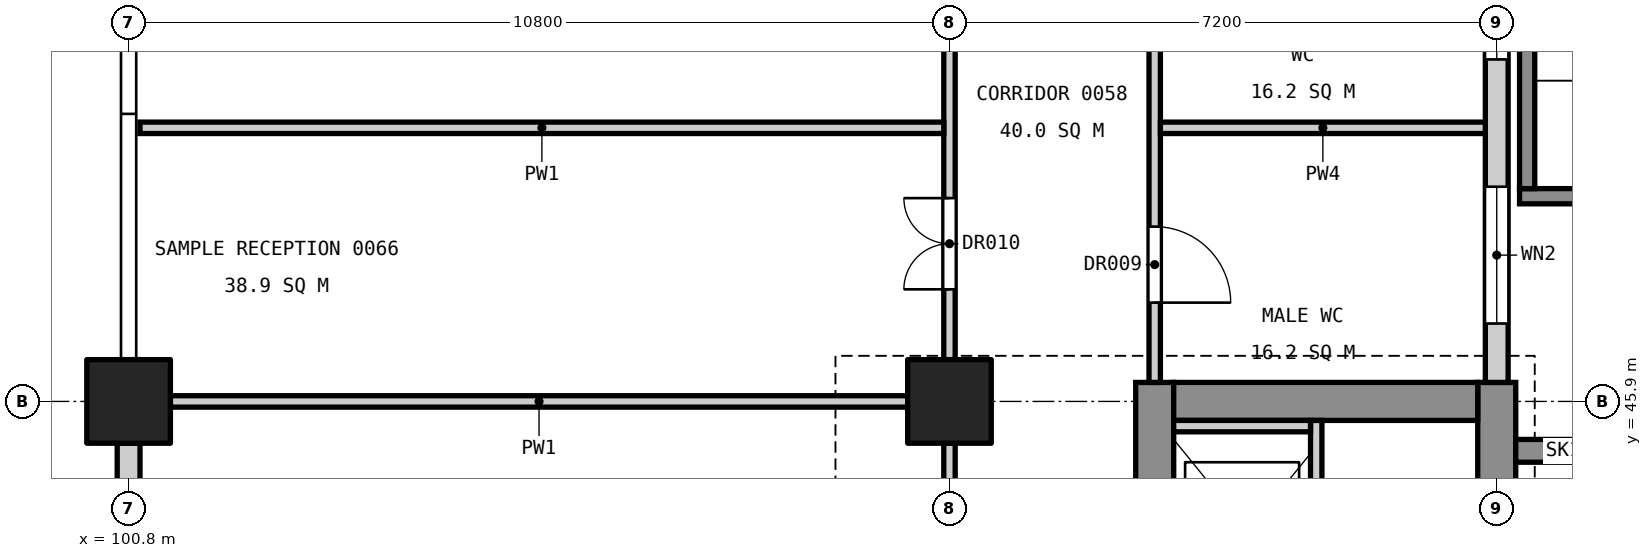
"""IFC4 building model, lengths in metres.
Left out: names, types, materials, properties, quantities, classifications, styles, units other than length and angle.
Written with IfcOpenShell. Run it as: python <this file> out.ifc"""

import sys

from ifc_helpers import new_model, si_unit, direction, frame, frame_2d, origin, origin_2d, place, context, subcontext, project, spatial, rectangle, extrude, element, fill, save


model = new_model("IFC4")
c1 = context("Model", 3, precision=1e-05, world=origin(), true_north=direction((0.0, 1.0)))
c2 = subcontext(c1, "Body", "Model", "MODEL_VIEW")
j1 = project(units=[si_unit("LENGTHUNIT", "METRE"), si_unit("PLANEANGLEUNIT", "RADIAN")], contexts=[c1])
p1 = place(None, origin())
s1 = spatial("IfcSite", under=j1, at=p1, CompositionType="ELEMENT")
p2 = place(p1, origin())
s2 = spatial("IfcBuilding", under=s1, at=p2, CompositionType="ELEMENT")
p3 = place(p2, origin())
s3 = spatial("IfcBuildingStorey", under=s2, at=p3, CompositionType="ELEMENT", Elevation=0.0)
for number, where, z_axis, x_axis in (
    (1, (111.6, 45.9, 0.0), (0.0, 0.0, 1.0), (1.0, 0.0, 0.0)),
    (2, (100.8, 45.9, 0.0), (0.0, 0.0, 1.0), (1.0, 0.0, 0.0)),
):
    element("IfcColumn", number, at=place(p3, frame(where, z_axis=z_axis, x_axis=x_axis)), inside=s3, PredefinedType="COLUMN", context=c2, shape_type="SweptSolid", body=[
        extrude(rectangle(XDim=1.1, YDim=1.1, at=origin_2d()), origin(), (0.0, 0.0, 1.0), 6.0),
    ])
p4 = place(p3, frame((118.8, 34.85, 0.0), z_axis=(0.0, 0.0, 1.0), x_axis=(0.0, 1.0, 0.0)))
e3 = element("IfcWall", 3, at=p4, inside=s3, PredefinedType="SHEAR", context=c2, shape_type="SweptSolid", body=[
    extrude(rectangle(XDim=11.3, YDim=0.5, at=frame_2d((5.65, 0.0))), origin(), (0.0, 0.0, 1.0), 5.7),
])
p5 = place(p4, frame((6.58, 0.0, 3.4)))
e4 = element("IfcOpeningElement", 4, at=p5, cuts=e3, PredefinedType="OPENING", context=c2, shape_type="SweptSolid", body=[
    extrude(rectangle(XDim=1.2, YDim=0.9, at=frame_2d((0.6, 0.45))), frame((0.0, 0.26, 0.0), z_axis=(0.0, -1.0, 0.0), x_axis=(1.0, 0.0, 0.0)), (0.0, 0.0, 1.0), 0.52),
])
p6 = place(p3, frame((114.3, 34.85, 0.0), z_axis=(0.0, 0.0, 1.0), x_axis=(0.0, 1.0, 0.0)))
e5 = element("IfcWall", 5, at=p6, inside=s3, PredefinedType="SHEAR", context=c2, shape_type="SweptSolid", body=[
    extrude(rectangle(XDim=11.3, YDim=0.5, at=frame_2d((5.65, 0.0))), origin(), (0.0, 0.0, 1.0), 5.7),
])
p7 = place(p6, frame((0.55, 0.0, 0.0)))
e6 = element("IfcOpeningElement", 6, at=p7, cuts=e5, PredefinedType="OPENING", context=c2, shape_type="SweptSolid", body=[
    extrude(rectangle(XDim=1.4, YDim=2.1, at=frame_2d((0.7, 1.05))), frame((0.0, 0.26, 0.0), z_axis=(0.0, -1.0, 0.0), x_axis=(1.0, 0.0, 0.0)), (0.0, 0.0, 1.0), 0.52),
])
p8 = place(p6, frame((8.8, 0.0, 0.0)))
e7 = element("IfcOpeningElement", 7, at=p8, cuts=e5, PredefinedType="OPENING", context=c2, shape_type="SweptSolid", body=[
    extrude(rectangle(XDim=1.1, YDim=2.1, at=frame_2d((0.55, 1.05))), frame((0.0, 0.26, 0.0), z_axis=(0.0, -1.0, 0.0), x_axis=(1.0, 0.0, 0.0)), (0.0, 0.0, 1.0), 0.52),
])
p9 = place(p3, frame((118.55, 45.9, 0.0), z_axis=(0.0, 0.0, 1.0), x_axis=(-1.0, 0.0, 0.0)))
e8 = element("IfcWall", 8, at=p9, inside=s3, PredefinedType="SHEAR", context=c2, shape_type="SweptSolid", body=[
    extrude(rectangle(XDim=4.0, YDim=0.5, at=frame_2d((2.0, 0.0))), origin(), (0.0, 0.0, 1.0), 5.7),
])
p10 = place(p3, frame((119.05, 45.25, 0.0), z_axis=(0.0, 0.0, 1.0), x_axis=(1.0, 0.0, 0.0)))
e9 = element("IfcWall", 9, at=p10, inside=s3, PredefinedType="SHEAR", context=c2, shape_type="SweptSolid", body=[
    extrude(rectangle(XDim=1.25, YDim=0.3, at=frame_2d((0.625, 0.0))), origin(), (0.0, 0.0, 1.0), 6.0),
])
p11 = place(p3, frame((116.425, 43.0, 0.0), z_axis=(0.0, 0.0, 1.0), x_axis=(0.0, 1.0, 0.0)))
e10 = element("IfcWall", 10, at=p11, inside=s3, PredefinedType="SOLIDWALL", context=c2, shape_type="SweptSolid", body=[
    extrude(rectangle(XDim=2.65, YDim=0.15, at=frame_2d((1.325, 0.0))), origin(), (0.0, 0.0, 1.0), 6.0),
])
p12 = place(p3, frame((116.35, 45.575, 0.0), z_axis=(0.0, 0.0, 1.0), x_axis=(-1.0, 0.0, 0.0)))
e11 = element("IfcWall", 11, at=p12, inside=s3, PredefinedType="SOLIDWALL", context=c2, shape_type="SweptSolid", body=[
    extrude(rectangle(XDim=1.8, YDim=0.15, at=frame_2d((0.9, 0.0))), origin(), (0.0, 0.0, 1.0), 6.0),
])
p13 = place(p3, frame((118.8, 46.15, 0.0), z_axis=(0.0, 0.0, 1.0), x_axis=(0.0, 1.0, 0.0)))
e12 = element("IfcWall", 12, at=p13, inside=s3, PredefinedType="STANDARD", context=c2, shape_type="SweptSolid", body=[
    extrude(rectangle(XDim=10.0, YDim=0.3, at=frame_2d((5.0, 0.0))), origin(), (0.0, 0.0, 1.0), 4.7),
])
p14 = place(p13, frame((0.775, 0.0, 0.9)))
e13 = element("IfcOpeningElement", 13, at=p14, cuts=e12, PredefinedType="OPENING", context=c2, shape_type="SweptSolid", body=[
    extrude(rectangle(XDim=1.8, YDim=3.0, at=frame_2d((0.9, 1.5))), frame((0.0, 0.16, 0.0), z_axis=(0.0, -1.0, 0.0), x_axis=(1.0, 0.0, 0.0)), (0.0, 0.0, 1.0), 0.32),
])
p15 = place(p13, frame((4.25, 0.0, 0.9)))
e14 = element("IfcOpeningElement", 14, at=p15, cuts=e12, PredefinedType="OPENING", context=c2, shape_type="SweptSolid", body=[
    extrude(rectangle(XDim=1.8, YDim=3.0, at=frame_2d((0.9, 1.5))), frame((0.0, 0.16, 0.0), z_axis=(0.0, -1.0, 0.0), x_axis=(1.0, 0.0, 0.0)), (0.0, 0.0, 1.0), 0.32),
])
p16 = place(p13, frame((7.575, 0.0, 0.9)))
e15 = element("IfcOpeningElement", 15, at=p16, cuts=e12, PredefinedType="OPENING", context=c2, shape_type="SweptSolid", body=[
    extrude(rectangle(XDim=1.8, YDim=3.0, at=frame_2d((0.9, 1.5))), frame((0.0, 0.16, 0.0), z_axis=(0.0, -1.0, 0.0), x_axis=(1.0, 0.0, 0.0)), (0.0, 0.0, 1.0), 0.32),
])
p17 = place(p3, frame((100.8, 35.65, 0.0), z_axis=(0.0, 0.0, 1.0), x_axis=(0.0, 1.0, 0.0)))
e16 = element("IfcWall", 16, at=p17, inside=s3, PredefinedType="STANDARD", context=c2, shape_type="SweptSolid", body=[
    extrude(rectangle(XDim=9.7, YDim=0.3, at=frame_2d((4.85, 0.0))), origin(), (0.0, 0.0, 1.0), 4.6),
])
p18 = place(p3, frame((114.3, 46.15, 0.0), z_axis=(0.0, 0.0, 1.0), x_axis=(0.0, 1.0, 0.0)))
e17 = element("IfcWall", 17, at=p18, inside=s3, PredefinedType="PARTITIONING", context=c2, shape_type="SweptSolid", body=[
    extrude(rectangle(XDim=10.4, YDim=0.15, at=frame_2d((5.2, 0.0))), origin(), (0.0, 0.0, 1.0), 4.6),
])
p19 = place(p18, frame((4.65, 0.0, 0.0)))
e18 = element("IfcOpeningElement", 18, at=p19, cuts=e17, PredefinedType="OPENING", context=c2, shape_type="SweptSolid", body=[
    extrude(rectangle(XDim=1.0, YDim=2.1, at=frame_2d((0.5, 1.05))), frame((0.0, 0.085, 0.0), z_axis=(0.0, -1.0, 0.0), x_axis=(1.0, 0.0, 0.0)), (0.0, 0.0, 1.0), 0.17),
])
p20 = place(p18, frame((1.05, 0.0, 0.0)))
e19 = element("IfcOpeningElement", 19, at=p20, cuts=e17, PredefinedType="OPENING", context=c2, shape_type="SweptSolid", body=[
    extrude(rectangle(XDim=1.0, YDim=2.1, at=frame_2d((0.5, 1.05))), frame((0.0, 0.085, 0.0), z_axis=(0.0, -1.0, 0.0), x_axis=(1.0, 0.0, 0.0)), (0.0, 0.0, 1.0), 0.17),
])
p21 = place(p18, frame((8.25, 0.0, 0.0)))
e20 = element("IfcOpeningElement", 20, at=p21, cuts=e17, PredefinedType="OPENING", context=c2, shape_type="SweptSolid", body=[
    extrude(rectangle(XDim=1.0, YDim=2.1, at=frame_2d((0.5, 1.05))), frame((0.0, 0.085, 0.0), z_axis=(0.0, -1.0, 0.0), x_axis=(1.0, 0.0, 0.0)), (0.0, 0.0, 1.0), 0.17),
])
p22 = place(p3, frame((118.65, 49.5, 0.0), z_axis=(0.0, 0.0, 1.0), x_axis=(-1.0, 0.0, 0.0)))
e21 = element("IfcWall", 21, at=p22, inside=s3, PredefinedType="PARTITIONING", context=c2, shape_type="SweptSolid", body=[
    extrude(rectangle(XDim=4.275, YDim=0.15, at=frame_2d((2.137, 0.0))), origin(), (0.0, 0.0, 1.0), 4.9),
])
p23 = place(p3, frame((111.6, 41.9, 0.0), z_axis=(0.0, 0.0, 1.0), x_axis=(0.0, 1.0, 0.0)))
e22 = element("IfcWall", 22, at=p23, inside=s3, PredefinedType="PARTITIONING", context=c2, shape_type="SweptSolid", body=[
    extrude(rectangle(XDim=3.45, YDim=0.15, at=frame_2d((1.725, 0.0))), origin(), (0.0, 0.0, 1.0), 4.6),
])
p24 = place(p23, frame((1.125, 0.0, 0.0)))
e23 = element("IfcOpeningElement", 23, at=p24, cuts=e22, PredefinedType="OPENING", context=c2, shape_type="SweptSolid", body=[
    extrude(rectangle(XDim=1.2, YDim=2.1, at=frame_2d((0.6, 1.05))), frame((0.0, 0.085, 0.0), z_axis=(0.0, -1.0, 0.0), x_axis=(1.0, 0.0, 0.0)), (0.0, 0.0, 1.0), 0.17),
])
p25 = place(p3, frame((111.6, 46.45, 0.0), z_axis=(0.0, 0.0, 1.0), x_axis=(0.0, 1.0, 0.0)))
e24 = element("IfcWall", 24, at=p25, inside=s3, PredefinedType="PARTITIONING", context=c2, shape_type="SweptSolid", body=[
    extrude(rectangle(XDim=9.7, YDim=0.15, at=frame_2d((4.85, 0.0))), origin(), (0.0, 0.0, 1.0), 4.6),
])
p26 = place(p25, frame((4.25, 0.0, 0.0)))
e25 = element("IfcOpeningElement", 25, at=p26, cuts=e24, PredefinedType="OPENING", context=c2, shape_type="SweptSolid", body=[
    extrude(rectangle(XDim=1.2, YDim=2.1, at=frame_2d((0.6, 1.05))), frame((0.0, 0.085, 0.0), z_axis=(0.0, -1.0, 0.0), x_axis=(1.0, 0.0, 0.0)), (0.0, 0.0, 1.0), 0.17),
])
p27 = place(p25, frame((0.925, 0.0, 0.0)))
e26 = element("IfcOpeningElement", 26, at=p27, cuts=e24, PredefinedType="OPENING", context=c2, shape_type="SweptSolid", body=[
    extrude(rectangle(XDim=1.2, YDim=2.1, at=frame_2d((0.6, 1.05))), frame((0.0, 0.085, 0.0), z_axis=(0.0, -1.0, 0.0), x_axis=(1.0, 0.0, 0.0)), (0.0, 0.0, 1.0), 0.17),
])
p28 = place(p25, frame((7.575, 0.0, 0.0)))
e27 = element("IfcOpeningElement", 27, at=p28, cuts=e24, PredefinedType="OPENING", context=c2, shape_type="SweptSolid", body=[
    extrude(rectangle(XDim=1.2, YDim=2.1, at=frame_2d((0.6, 1.05))), frame((0.0, 0.085, 0.0), z_axis=(0.0, -1.0, 0.0), x_axis=(1.0, 0.0, 0.0)), (0.0, 0.0, 1.0), 0.17),
])
p29 = place(p3, frame((111.05, 45.9, 0.0), z_axis=(0.0, 0.0, 1.0), x_axis=(-1.0, 0.0, 0.0)))
e28 = element("IfcWall", 28, at=p29, inside=s3, PredefinedType="PARTITIONING", context=c2, shape_type="SweptSolid", body=[
    extrude(rectangle(XDim=9.7, YDim=0.15, at=frame_2d((4.85, 0.0))), origin(), (0.0, 0.0, 1.0), 4.9),
])
p30 = place(p3, frame((111.525, 49.5, 0.0), z_axis=(0.0, 0.0, 1.0), x_axis=(-1.0, 0.0, 0.0)))
e29 = element("IfcWall", 29, at=p30, inside=s3, PredefinedType="PARTITIONING", context=c2, shape_type="SweptSolid", body=[
    extrude(rectangle(XDim=10.575, YDim=0.15, at=frame_2d((5.288, 0.0))), origin(), (0.0, 0.0, 1.0), 4.9),
])
p31 = place(p3, frame((119.1, 48.6, 0.0), z_axis=(0.0, 0.0, 1.0), x_axis=(1.0, 0.0, 0.0)))
e30 = element("IfcWall", 30, at=p31, inside=s3, PredefinedType="SOLIDWALL", context=c2, shape_type="SweptSolid", body=[
    extrude(rectangle(XDim=4.4, YDim=0.2, at=frame_2d((2.2, 0.0))), origin(), (0.0, 0.0, 1.0), 3.3),
])
p32 = place(p31, frame((1.5, 0.0, 0.0)))
e31 = element("IfcOpeningElement", 31, at=p32, cuts=e30, PredefinedType="OPENING", context=c2, shape_type="SweptSolid", body=[
    extrude(rectangle(XDim=1.4, YDim=2.1, at=frame_2d((0.7, 1.05))), frame((0.0, 0.11, 0.0), z_axis=(0.0, -1.0, 0.0), x_axis=(1.0, 0.0, 0.0)), (0.0, 0.0, 1.0), 0.22),
])
p33 = place(p3, frame((119.2, 48.7, 0.0), z_axis=(0.0, 0.0, 1.0), x_axis=(0.0, 1.0, 0.0)))
e32 = element("IfcWall", 32, at=p33, inside=s3, PredefinedType="SOLIDWALL", context=c2, shape_type="SweptSolid", body=[
    extrude(rectangle(XDim=6.8, YDim=0.2, at=frame_2d((3.4, 0.0))), origin(), (0.0, 0.0, 1.0), 3.3),
])
p34 = place(p14, origin())
e33 = element("IfcWindow", 33, at=p34, inside=s3, PartitioningType="SINGLE_PANEL", PredefinedType="WINDOW", context=c2, shape_type="SweptSolid", body=[
    extrude(rectangle(XDim=1.8, YDim=3.0, at=frame_2d((0.9, 1.5))), frame((0.0, 0.03, 0.0), z_axis=(0.0, -1.0, 0.0), x_axis=(1.0, 0.0, 0.0)), (0.0, 0.0, 1.0), 0.06),
])
fill(e13, e33)
p35 = place(p15, origin())
e34 = element("IfcWindow", 34, at=p35, inside=s3, PartitioningType="SINGLE_PANEL", PredefinedType="WINDOW", context=c2, shape_type="SweptSolid", body=[
    extrude(rectangle(XDim=1.8, YDim=3.0, at=frame_2d((0.9, 1.5))), frame((0.0, 0.03, 0.0), z_axis=(0.0, -1.0, 0.0), x_axis=(1.0, 0.0, 0.0)), (0.0, 0.0, 1.0), 0.06),
])
fill(e14, e34)
p36 = place(p20, frame((1.0, 0.0, 0.0), z_axis=(0.0, 0.0, 1.0), x_axis=(-1.0, 0.0, 0.0)))
e35 = element("IfcDoor", 35, at=p36, inside=s3, OperationType="SINGLE_SWING_RIGHT", PredefinedType="DOOR", context=c2, shape_type="SweptSolid", body=[
    extrude(rectangle(XDim=1.0, YDim=2.1, at=frame_2d((0.5, 1.05))), frame((0.0, 0.025, 0.0), z_axis=(0.0, -1.0, 0.0), x_axis=(1.0, 0.0, 0.0)), (0.0, 0.0, 1.0), 0.05),
])
fill(e19, e35)
p37 = place(p27, origin())
e36 = element("IfcDoor", 36, at=p37, inside=s3, OperationType="DOUBLE_DOOR_SINGLE_SWING", PredefinedType="DOOR", context=c2, shape_type="SweptSolid", body=[
    extrude(rectangle(XDim=1.2, YDim=2.1, at=frame_2d((0.6, 1.05))), frame((0.0, 0.025, 0.0), z_axis=(0.0, -1.0, 0.0), x_axis=(1.0, 0.0, 0.0)), (0.0, 0.0, 1.0), 0.05),
])
fill(e26, e36)
save(model, sys.argv[1])
